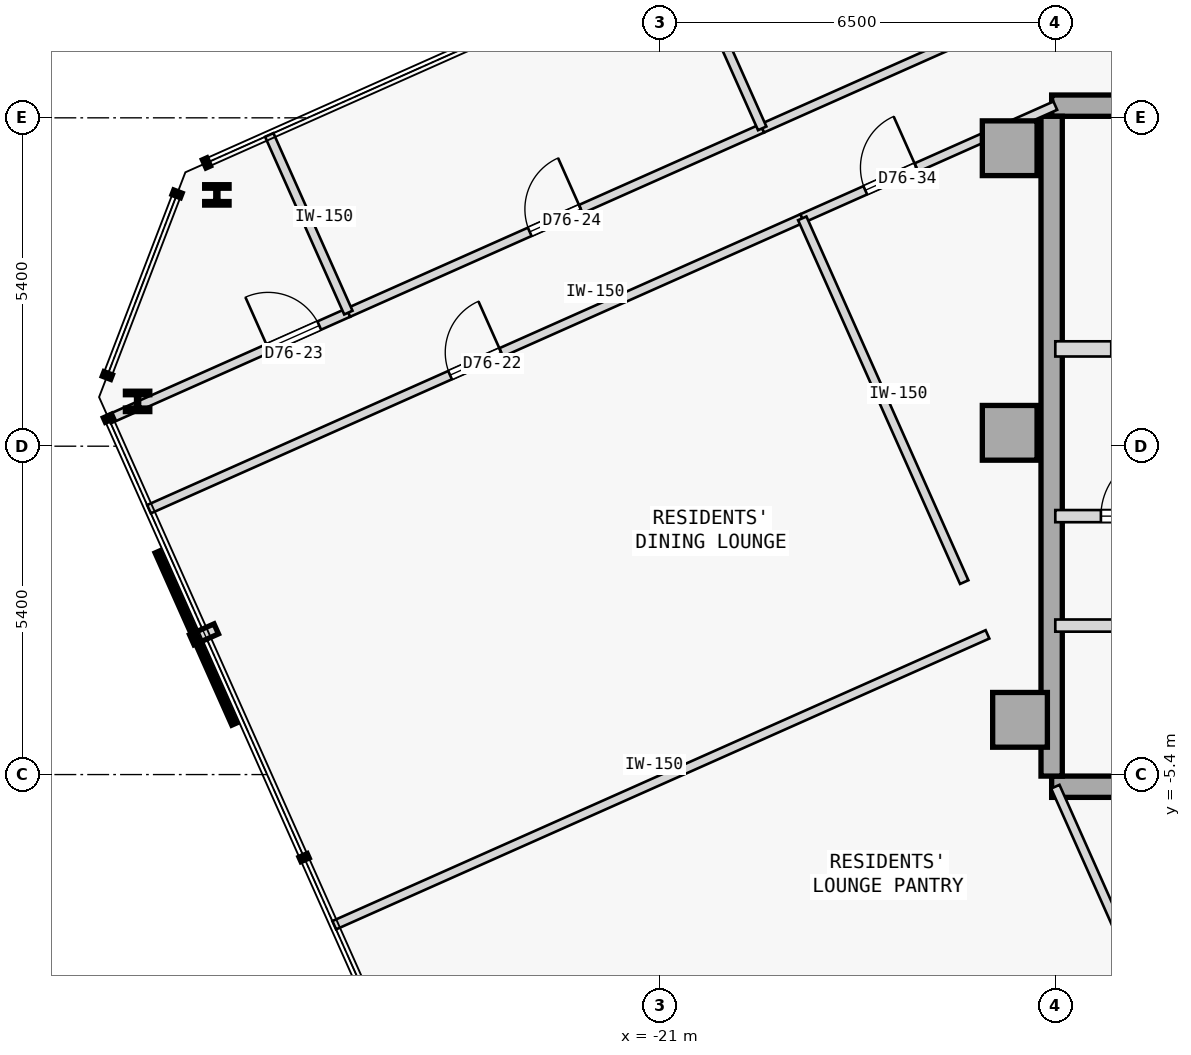
"""IFC4 building model, lengths in metres.
Left out: names, types, materials, properties, quantities, classifications, styles, units other than length and angle.
Written with IfcOpenShell. Run it as: python <this file> out.ifc"""

import sys

from ifc_helpers import new_model, si_unit, direction, frame, frame_2d, origin, origin_2d, place, context, subcontext, project, spatial, rectangle, i_section, extrude, element, fill, save


model = new_model("IFC4")
c1 = context("Model", 3, precision=1e-05, world=origin(), true_north=direction((0.0, 1.0)))
c2 = subcontext(c1, "Body", "Model", "MODEL_VIEW")
j1 = project(units=[si_unit("LENGTHUNIT", "METRE"), si_unit("PLANEANGLEUNIT", "RADIAN")], contexts=[c1])
p1 = place(None, origin())
s1 = spatial("IfcSite", under=j1, at=p1, CompositionType="ELEMENT")
p2 = place(p1, origin())
s2 = spatial("IfcBuilding", under=s1, at=p2, CompositionType="ELEMENT")
p3 = place(p2, frame((0.0, 0.0, 285.25)))
s3 = spatial("IfcBuildingStorey", under=s2, at=p3, CompositionType="ELEMENT", Elevation=285.25)
for number, where, z_axis, x_axis in (
    (1, (-15.25, 4.9, 0.0), (0.0, 0.0, 1.0), (1.0, 0.0, 0.0)),
    (2, (-15.25, 0.22, 0.0), (0.0, 0.0, 1.0), (1.0, 0.0, 0.0)),
    (3, (-15.08, -4.5, 0.0), (0.0, 0.0, 1.0), (1.0, 0.0, 0.0)),
):
    element("IfcColumn", number, at=place(p3, frame(where, z_axis=z_axis, x_axis=x_axis)), inside=s3, PredefinedType="COLUMN", context=c2, shape_type="SweptSolid", body=[
        extrude(rectangle(XDim=0.9, YDim=0.9, at=origin_2d()), origin(), (0.0, 0.0, 1.0), 3.35),
    ])
p4 = place(p3, frame((-14.56, 5.6, 0.0), z_axis=(0.0, 0.0, 1.0), x_axis=(1.0, 0.0, 0.0)))
e4 = element("IfcWall", 4, at=p4, inside=s3, PredefinedType="SHEAR", context=c2, shape_type="SweptSolid", body=[
    extrude(rectangle(XDim=11.41, YDim=0.35, at=frame_2d((5.705, 0.0))), origin(), (0.0, 0.0, 1.0), 3.125),
])
p5 = place(p3, frame((-14.56, -5.6, 0.0), z_axis=(0.0, 0.0, 1.0), x_axis=(1.0, 0.0, 0.0)))
e5 = element("IfcWall", 5, at=p5, inside=s3, PredefinedType="SHEAR", context=c2, shape_type="SweptSolid", body=[
    extrude(rectangle(XDim=10.86, YDim=0.35, at=frame_2d((5.43, 0.0))), origin(), (0.0, 0.0, 1.0), 3.125),
])
p6 = place(p3, frame((-14.56, -5.425, 0.0), z_axis=(0.0, 0.0, 1.0), x_axis=(0.0, 1.0, 0.0)))
e6 = element("IfcWall", 6, at=p6, inside=s3, PredefinedType="SHEAR", context=c2, shape_type="SweptSolid", body=[
    extrude(rectangle(XDim=10.85, YDim=0.35, at=frame_2d((5.425, 0.0))), origin(), (0.0, 0.0, 1.0), 3.125),
])
for number, where, z_axis, x_axis in (
    (7, (-28.288, 4.133, 0.0), (0.0, 0.0, 1.0), (1.0, 0.0, 0.0)),
    (8, (-29.592, 0.737, 0.0), (0.0, 0.0, 1.0), (1.0, 0.0, 0.0)),
):
    element("IfcColumn", number, at=place(p3, frame(where, z_axis=z_axis, x_axis=x_axis)), inside=s3, PredefinedType="COLUMN", context=c2, shape_type="SweptSolid", body=[
        extrude(i_section(OverallWidth=0.401, OverallDepth=0.335, WebThickness=0.036, FlangeThickness=0.058, FilletRadius=0.015, at=origin_2d()), origin(), (0.0, 0.0, 1.0), 3.35),
    ])
p7 = place(p3, frame((-14.5, 1.6, 0.0), z_axis=(0.0, 0.0, 1.0), x_axis=(1.0, 0.0, 0.0)))
e9 = element("IfcWall", 9, at=p7, inside=s3, PredefinedType="STANDARD", context=c2, shape_type="SweptSolid", body=[
    extrude(rectangle(XDim=3.6, YDim=0.25, at=frame_2d((1.8, 0.0))), origin(), (0.0, 0.0, 1.0), 3.125),
])
p8 = place(p7, frame((0.92, 0.0, 0.0)))
e10 = element("IfcOpeningElement", 10, at=p8, cuts=e9, PredefinedType="OPENING", context=c2, shape_type="SweptSolid", body=[
    extrude(rectangle(XDim=1.05, YDim=2.15, at=frame_2d((0.525, 1.075))), frame((0.0, 0.135, 0.0), z_axis=(0.0, -1.0, 0.0), x_axis=(1.0, 0.0, 0.0)), (0.0, 0.0, 1.0), 0.27),
])
p9 = place(p3, frame((-14.5, -1.15, 0.0), z_axis=(0.0, 0.0, 1.0), x_axis=(1.0, 0.0, 0.0)))
e11 = element("IfcWall", 11, at=p9, inside=s3, PredefinedType="STANDARD", context=c2, shape_type="SweptSolid", body=[
    extrude(rectangle(XDim=2.95, YDim=0.2, at=frame_2d((1.475, 0.0))), origin(), (0.0, 0.0, 1.0), 3.125),
])
p10 = place(p9, frame((0.75, 0.0, 0.0)))
e12 = element("IfcOpeningElement", 12, at=p10, cuts=e11, PredefinedType="OPENING", context=c2, shape_type="SweptSolid", body=[
    extrude(rectangle(XDim=1.05, YDim=2.18, at=frame_2d((0.525, 1.09))), frame((0.0, 0.11, 0.0), z_axis=(0.0, -1.0, 0.0), x_axis=(1.0, 0.0, 0.0)), (0.0, 0.0, 1.0), 0.22),
])
p11 = place(p3, frame((-14.5, -2.95, 0.0), z_axis=(0.0, 0.0, 1.0), x_axis=(1.0, 0.0, 0.0)))
e13 = element("IfcWall", 13, at=p11, inside=s3, PredefinedType="STANDARD", context=c2, shape_type="SweptSolid", body=[
    extrude(rectangle(XDim=10.8, YDim=0.2, at=frame_2d((5.4, 0.0))), origin(), (0.0, 0.0, 1.0), 3.125),
])
p12 = place(p11, frame((9.17, 0.0, 0.0)))
e14 = element("IfcOpeningElement", 14, at=p12, cuts=e13, PredefinedType="OPENING", context=c2, shape_type="SweptSolid", body=[
    extrude(rectangle(XDim=1.1, YDim=2.15, at=frame_2d((0.55, 1.075))), frame((0.0, 0.11, 0.0), z_axis=(0.0, -1.0, 0.0), x_axis=(1.0, 0.0, 0.0)), (0.0, 0.0, 1.0), 0.22),
])
p13 = place(p11, frame((1.73, 0.0, 0.0)))
e15 = element("IfcOpeningElement", 15, at=p13, cuts=e13, PredefinedType="OPENING", context=c2, shape_type="SweptSolid", body=[
    extrude(rectangle(XDim=0.92, YDim=2.15, at=frame_2d((0.46, 1.075))), frame((0.0, 0.11, 0.0), z_axis=(0.0, -1.0, 0.0), x_axis=(1.0, 0.0, 0.0)), (0.0, 0.0, 1.0), 0.22),
])
p14 = place(p11, frame((6.05, 0.0, 0.0)))
e16 = element("IfcOpeningElement", 16, at=p14, cuts=e13, PredefinedType="OPENING", context=c2, shape_type="SweptSolid", body=[
    extrude(rectangle(XDim=0.92, YDim=2.15, at=frame_2d((0.46, 1.075))), frame((0.0, 0.11, 0.0), z_axis=(0.0, -1.0, 0.0), x_axis=(1.0, 0.0, 0.0)), (0.0, 0.0, 1.0), 0.22),
])
p15 = place(p3, frame((-29.404, -1.036, 0.0), z_axis=(0.0, 0.0, 1.0), x_axis=(0.913544247064, 0.406739362069, 0.0)))
e17 = element("IfcWall", 17, at=p15, inside=s3, PredefinedType="PARTITIONING", context=c2, shape_type="SweptSolid", body=[
    extrude(rectangle(XDim=11.76, YDim=0.15, at=frame_2d((5.88, 0.0))), origin(), (0.0, 0.0, 1.0), 3.125),
])
p16 = place(p15, frame((5.42, 0.0, 0.0)))
e18 = element("IfcOpeningElement", 18, at=p16, cuts=e17, PredefinedType="OPENING", context=c2, shape_type="SweptSolid", body=[
    extrude(rectangle(XDim=0.92, YDim=2.15, at=frame_2d((0.46, 1.075))), frame((0.0, 0.085, 0.0), z_axis=(0.0, -1.0, 0.0), x_axis=(1.0, 0.0, 0.0)), (0.0, 0.0, 1.0), 0.17),
])
p17 = place(p3, frame((-30.063, 0.444, 0.0), z_axis=(0.0, 0.0, 1.0), x_axis=(0.91352868173, 0.406774320302, 0.0)))
e19 = element("IfcWall", 19, at=p17, inside=s3, PredefinedType="PARTITIONING", context=c2, shape_type="SweptSolid", body=[
    extrude(rectangle(XDim=4.31, YDim=0.15, at=frame_2d((2.155, 0.0))), origin(), (0.0, 0.0, 1.0), 3.125),
])
p18 = place(p17, frame((2.866, 0.0, 0.0)))
e20 = element("IfcOpeningElement", 20, at=p18, cuts=e19, PredefinedType="OPENING", context=c2, shape_type="SweptSolid", body=[
    extrude(rectangle(XDim=0.92, YDim=2.15, at=frame_2d((0.46, 1.075))), frame((0.0, 0.085, 0.0), z_axis=(0.0, -1.0, 0.0), x_axis=(1.0, 0.0, 0.0)), (0.0, 0.0, 1.0), 0.17),
])
p19 = place(p3, frame((-26.126, 2.197, 0.0), z_axis=(0.0, 0.0, 1.0), x_axis=(0.913553251328, 0.40671913772, 0.0)))
e21 = element("IfcWall", 21, at=p19, inside=s3, PredefinedType="PARTITIONING", context=c2, shape_type="SweptSolid", body=[
    extrude(rectangle(XDim=7.45, YDim=0.15, at=frame_2d((3.725, 0.0))), origin(), (0.0, 0.0, 1.0), 3.125),
])
p20 = place(p19, frame((3.265, 0.0, 0.0)))
e22 = element("IfcOpeningElement", 22, at=p20, cuts=e21, PredefinedType="OPENING", context=c2, shape_type="SweptSolid", body=[
    extrude(rectangle(XDim=0.92, YDim=2.15, at=frame_2d((0.46, 1.075))), frame((0.0, 0.085, 0.0), z_axis=(0.0, -1.0, 0.0), x_axis=(1.0, 0.0, 0.0)), (0.0, 0.0, 1.0), 0.17),
])
p21 = place(p3, frame((-18.661, 3.747, 0.0), z_axis=(0.0, 0.0, 1.0), x_axis=(0.913535055583, 0.40676000568, 0.0)))
e23 = element("IfcWall", 23, at=p21, inside=s3, PredefinedType="PARTITIONING", context=c2, shape_type="SweptSolid", body=[
    extrude(rectangle(XDim=4.555, YDim=0.15, at=frame_2d((2.277, 0.0))), origin(), (0.0, 0.0, 1.0), 3.125),
])
p22 = place(p21, frame((1.134, 0.0, 0.0)))
e24 = element("IfcOpeningElement", 24, at=p22, cuts=e23, PredefinedType="OPENING", context=c2, shape_type="SweptSolid", body=[
    extrude(rectangle(XDim=0.92, YDim=2.15, at=frame_2d((0.46, 1.075))), frame((0.0, 0.085, 0.0), z_axis=(0.0, -1.0, 0.0), x_axis=(1.0, 0.0, 0.0)), (0.0, 0.0, 1.0), 0.17),
])
p23 = place(p3, frame((-19.32, 5.227, 0.0), z_axis=(0.0, 0.0, 1.0), x_axis=(0.913543828741, 0.406740301628, 0.0)))
e25 = element("IfcWall", 25, at=p23, inside=s3, PredefinedType="PARTITIONING", context=c2, shape_type="SweptSolid", body=[
    extrude(rectangle(XDim=11.177, YDim=0.15, at=frame_2d((5.588, 0.0))), origin(), (0.0, 0.0, 1.0), 3.125),
])
p24 = place(p23, frame((5.128, 0.0, 0.0)))
e26 = element("IfcOpeningElement", 26, at=p24, cuts=e25, PredefinedType="OPENING", context=c2, shape_type="SweptSolid", body=[
    extrude(rectangle(XDim=0.92, YDim=2.15, at=frame_2d((0.46, 1.075))), frame((0.0, 0.085, 0.0), z_axis=(0.0, -1.0, 0.0), x_axis=(1.0, 0.0, 0.0)), (0.0, 0.0, 1.0), 0.17),
])
p25 = place(p3, frame((-26.358, -7.878, 0.0), z_axis=(0.0, 0.0, 1.0), x_axis=(0.913547681516, 0.406731648137, 0.0)))
e27 = element("IfcWall", 27, at=p25, inside=s3, PredefinedType="PARTITIONING", context=c2, shape_type="SweptSolid", body=[
    extrude(rectangle(XDim=11.76, YDim=0.15, at=frame_2d((5.88, 0.0))), origin(), (0.0, 0.0, 1.0), 3.125),
])
p26 = place(p3, frame((-13.017, -8.93, 0.0), z_axis=(0.0, 0.0, 1.0), x_axis=(-0.406722395322, 0.913551801018, 0.0)))
e28 = element("IfcWall", 28, at=p26, inside=s3, PredefinedType="PARTITIONING", context=c2, shape_type="SweptSolid", body=[
    extrude(rectangle(XDim=3.646, YDim=0.15, at=frame_2d((1.823, 0.0))), origin(), (0.0, 0.0, 1.0), 3.125),
])
p27 = place(p3, frame((-15.998, -2.235, 0.0), z_axis=(0.0, 0.0, 1.0), x_axis=(-0.406736853191, 0.913545364093, 0.0)))
e29 = element("IfcWall", 29, at=p27, inside=s3, PredefinedType="PARTITIONING", context=c2, shape_type="SweptSolid", body=[
    extrude(rectangle(XDim=6.548, YDim=0.15, at=frame_2d((3.274, 0.0))), origin(), (0.0, 0.0, 1.0), 3.125),
])
for number, where, z_axis, x_axis in (
    (30, (-26.126, 2.197, 0.0), (0.0, 0.0, 1.0), (-0.407, 0.914, 0.0)),
    (31, (-19.32, 5.227, 0.0), (0.0, 0.0, 1.0), (-0.407, 0.914, 0.0)),
):
    element("IfcWall", number, at=place(p3, frame(where, z_axis=z_axis, x_axis=x_axis)), inside=s3, PredefinedType="PARTITIONING", context=c2, shape_type="SweptSolid", body=[
        extrude(rectangle(XDim=3.198, YDim=0.15, at=frame_2d((1.599, 0.0))), origin(), (0.0, 0.0, 1.0), 3.125),
    ])
p28 = place(p10, origin())
e32 = element("IfcDoor", 32, at=p28, inside=s3, OperationType="SINGLE_SWING_RIGHT", PredefinedType="DOOR", context=c2, shape_type="SweptSolid", body=[
    extrude(rectangle(XDim=1.05, YDim=2.18, at=frame_2d((0.525, 1.09))), frame((0.0, 0.025, 0.0), z_axis=(0.0, -1.0, 0.0), x_axis=(1.0, 0.0, 0.0)), (0.0, 0.0, 1.0), 0.05),
])
fill(e12, e32)
p29 = place(p16, origin())
e33 = element("IfcDoor", 33, at=p29, inside=s3, OperationType="SINGLE_SWING_RIGHT", PredefinedType="DOOR", context=c2, shape_type="SweptSolid", body=[
    extrude(rectangle(XDim=0.92, YDim=2.15, at=frame_2d((0.46, 1.075))), frame((0.0, 0.025, 0.0), z_axis=(0.0, -1.0, 0.0), x_axis=(1.0, 0.0, 0.0)), (0.0, 0.0, 1.0), 0.05),
])
fill(e18, e33)
p30 = place(p18, origin())
e34 = element("IfcDoor", 34, at=p30, inside=s3, OperationType="SINGLE_SWING_LEFT", PredefinedType="DOOR", context=c2, shape_type="SweptSolid", body=[
    extrude(rectangle(XDim=0.92, YDim=2.15, at=frame_2d((0.46, 1.075))), frame((0.0, 0.025, 0.0), z_axis=(0.0, -1.0, 0.0), x_axis=(1.0, 0.0, 0.0)), (0.0, 0.0, 1.0), 0.05),
])
fill(e20, e34)
p31 = place(p20, origin())
e35 = element("IfcDoor", 35, at=p31, inside=s3, OperationType="SINGLE_SWING_RIGHT", PredefinedType="DOOR", context=c2, shape_type="SweptSolid", body=[
    extrude(rectangle(XDim=0.92, YDim=2.15, at=frame_2d((0.46, 1.075))), frame((0.0, 0.025, 0.0), z_axis=(0.0, -1.0, 0.0), x_axis=(1.0, 0.0, 0.0)), (0.0, 0.0, 1.0), 0.05),
])
fill(e22, e35)
p32 = place(p22, origin())
e36 = element("IfcDoor", 36, at=p32, inside=s3, OperationType="SINGLE_SWING_RIGHT", PredefinedType="DOOR", context=c2, shape_type="SweptSolid", body=[
    extrude(rectangle(XDim=0.92, YDim=2.15, at=frame_2d((0.46, 1.075))), frame((0.0, 0.025, 0.0), z_axis=(0.0, -1.0, 0.0), x_axis=(1.0, 0.0, 0.0)), (0.0, 0.0, 1.0), 0.05),
])
fill(e24, e36)
save(model, sys.argv[1])
